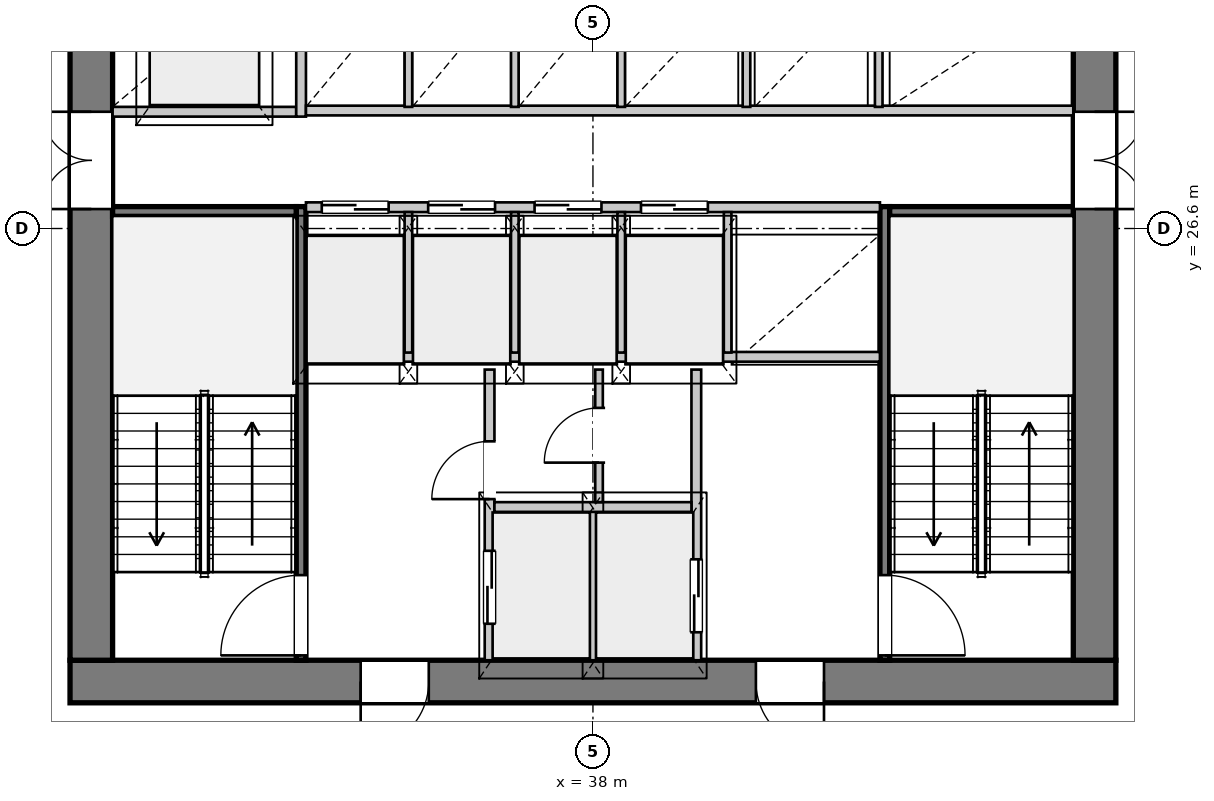
"""IFC4 building model, lengths in metres.
Left out: names, types, materials, properties, quantities, classifications, styles, units other than length and angle.
Written with IfcOpenShell. Run it as: python <this file> out.ifc"""

import sys

from ifc_helpers import new_model, si_unit, direction, frame, frame_2d, origin, place, context, subcontext, project, spatial, rectangle, extrude, source, transform, mapped, element, fill, save


model = new_model("IFC4")
c1 = context("Model", 3, precision=1e-05, world=origin(), true_north=direction((0.0, 1.0)))
c2 = subcontext(c1, "Body", "Model", "MODEL_VIEW")
j1 = project(units=[si_unit("LENGTHUNIT", "METRE"), si_unit("PLANEANGLEUNIT", "RADIAN")], contexts=[c1])
p1 = place(None, origin())
s1 = spatial("IfcSite", under=j1, at=p1, CompositionType="ELEMENT")
p2 = place(p1, origin())
s2 = spatial("IfcBuilding", under=s1, at=p2, CompositionType="ELEMENT")
p3 = place(p2, frame((0.0, 0.0, 127.0)))
s3 = spatial("IfcBuildingStorey", under=s2, at=p3, CompositionType="ELEMENT", Elevation=127.0)
p4 = place(p3, frame((46.6, 19.15, 0.0), z_axis=(0.0, 0.0, 1.0), x_axis=(-1.0, 0.0, 0.0)))
e1 = element("IfcWall", 1, at=p4, inside=s3, PredefinedType="SHEAR", context=c2, shape_type="SweptSolid", body=[
    extrude(rectangle(XDim=17.2, YDim=0.7, at=frame_2d((8.6, 0.0))), origin(), (0.0, 0.0, 1.0), 3.3),
])
p5 = place(p4, frame((4.8, 0.0, 0.0)))
e2 = element("IfcOpeningElement", 2, at=p5, cuts=e1, PredefinedType="OPENING", context=c2, shape_type="SweptSolid", body=[
    extrude(rectangle(XDim=1.12, YDim=2.25, at=frame_2d((0.56, 1.125))), frame((0.0, 0.36, 0.0), z_axis=(0.0, -1.0, 0.0), x_axis=(1.0, 0.0, 0.0)), (0.0, 0.0, 1.0), 0.72),
])
p6 = place(p4, frame((11.3, 0.0, 0.0)))
e3 = element("IfcOpeningElement", 3, at=p6, cuts=e1, PredefinedType="OPENING", context=c2, shape_type="SweptSolid", body=[
    extrude(rectangle(XDim=1.12, YDim=2.25, at=frame_2d((0.56, 1.125))), frame((0.0, 0.36, 0.0), z_axis=(0.0, -1.0, 0.0), x_axis=(1.0, 0.0, 0.0)), (0.0, 0.0, 1.0), 0.72),
])
p7 = place(p3, frame((29.75, 19.5, 0.0), z_axis=(0.0, 0.0, 1.0), x_axis=(0.0, 1.0, 0.0)))
e4 = element("IfcWall", 4, at=p7, inside=s3, PredefinedType="SHEAR", context=c2, shape_type="SweptSolid", body=[
    extrude(rectangle(XDim=14.2, YDim=0.7, at=frame_2d((7.1, 0.0))), origin(), (0.0, 0.0, 1.0), 3.3),
])
p8 = place(p7, frame((7.42, 0.0, 0.0)))
e5 = element("IfcOpeningElement", 5, at=p8, cuts=e4, PredefinedType="OPENING", context=c2, shape_type="SweptSolid", body=[
    extrude(rectangle(XDim=1.6, YDim=2.2, at=frame_2d((0.8, 1.1))), frame((0.0, 0.36, 0.0), z_axis=(0.0, -1.0, 0.0), x_axis=(1.0, 0.0, 0.0)), (0.0, 0.0, 1.0), 0.72),
])
p9 = place(p3, frame((46.25, 33.7, 0.0), z_axis=(0.0, 0.0, 1.0), x_axis=(0.0, -1.0, 0.0)))
e6 = element("IfcWall", 6, at=p9, inside=s3, PredefinedType="SHEAR", context=c2, shape_type="SweptSolid", body=[
    extrude(rectangle(XDim=14.2, YDim=0.7, at=frame_2d((7.1, 0.0))), origin(), (0.0, 0.0, 1.0), 3.3),
])
p10 = place(p9, frame((5.18, 0.0, 0.0)))
e7 = element("IfcOpeningElement", 7, at=p10, cuts=e6, PredefinedType="OPENING", context=c2, shape_type="SweptSolid", body=[
    extrude(rectangle(XDim=1.6, YDim=2.2, at=frame_2d((0.8, 1.1))), frame((0.0, 0.36, 0.0), z_axis=(0.0, -1.0, 0.0), x_axis=(1.0, 0.0, 0.0)), (0.0, 0.0, 1.0), 0.72),
])
p11 = place(p3, frame((33.2, 19.5, 0.0), z_axis=(0.0, 0.0, 1.0), x_axis=(0.0, 1.0, 0.0)))
e8 = element("IfcWall", 8, at=p11, inside=s3, PredefinedType="PARTITIONING", context=c2, shape_type="SweptSolid", body=[
    extrude(rectangle(XDim=7.46, YDim=0.16, at=frame_2d((3.73, 0.0))), origin(), (0.0, 0.0, 1.0), 3.3),
])
p12 = place(p11, frame((0.08, 0.0, 0.0)))
e9 = element("IfcOpeningElement", 9, at=p12, cuts=e8, PredefinedType="OPENING", context=c2, shape_type="SweptSolid", body=[
    extrude(rectangle(XDim=1.32, YDim=2.2, at=frame_2d((0.66, 1.1))), frame((0.0, 0.09, 0.0), z_axis=(0.0, -1.0, 0.0), x_axis=(1.0, 0.0, 0.0)), (0.0, 0.0, 1.0), 0.18),
])
p13 = place(p3, frame((30.1, 26.88, 0.0), z_axis=(0.0, 0.0, 1.0), x_axis=(1.0, 0.0, 0.0)))
e10 = element("IfcWall", 10, at=p13, inside=s3, PredefinedType="PARTITIONING", context=c2, shape_type="SweptSolid", body=[
    extrude(rectangle(XDim=3.02, YDim=0.16, at=frame_2d((1.51, 0.0))), origin(), (0.0, 0.0, 1.0), 3.3),
])
p14 = place(p3, frame((42.8, 26.96, 0.0), z_axis=(0.0, 0.0, 1.0), x_axis=(0.0, -1.0, 0.0)))
e11 = element("IfcWall", 11, at=p14, inside=s3, PredefinedType="PARTITIONING", context=c2, shape_type="SweptSolid", body=[
    extrude(rectangle(XDim=7.46, YDim=0.16, at=frame_2d((3.73, 0.0))), origin(), (0.0, 0.0, 1.0), 3.3),
])
p15 = place(p14, frame((6.06, 0.0, 0.0)))
e12 = element("IfcOpeningElement", 12, at=p15, cuts=e11, PredefinedType="OPENING", context=c2, shape_type="SweptSolid", body=[
    extrude(rectangle(XDim=1.32, YDim=2.2, at=frame_2d((0.66, 1.1))), frame((0.0, 0.09, 0.0), z_axis=(0.0, -1.0, 0.0), x_axis=(1.0, 0.0, 0.0)), (0.0, 0.0, 1.0), 0.18),
])
p16 = place(p3, frame((42.88, 26.88, 0.0), z_axis=(0.0, 0.0, 1.0), x_axis=(1.0, 0.0, 0.0)))
e13 = element("IfcWall", 13, at=p16, inside=s3, PredefinedType="PARTITIONING", context=c2, shape_type="SweptSolid", body=[
    extrude(rectangle(XDim=3.02, YDim=0.16, at=frame_2d((1.51, 0.0))), origin(), (0.0, 0.0, 1.0), 3.3),
])
p17 = place(p3, frame((36.3, 19.5, 0.0), z_axis=(0.0, 0.0, 1.0), x_axis=(0.0, 1.0, 0.0)))
e14 = element("IfcWall", 14, at=p17, inside=s3, PredefinedType="PARTITIONING", context=c2, shape_type="SweptSolid", body=[
    extrude(rectangle(XDim=4.78, YDim=0.16, at=frame_2d((2.39, 0.0))), origin(), (0.0, 0.0, 1.0), 3.3),
])
p18 = place(p17, frame((0.6, 0.0, 0.0)))
e15 = element("IfcOpeningElement", 15, at=p18, cuts=e14, PredefinedType="OPENING", context=c2, shape_type="SweptSolid", body=[
    extrude(rectangle(XDim=1.2, YDim=2.2, at=frame_2d((0.6, 1.1))), frame((0.0, 0.09, 0.0), z_axis=(0.0, -1.0, 0.0), x_axis=(1.0, 0.0, 0.0)), (0.0, 0.0, 1.0), 0.18),
])
p19 = place(p17, frame((2.65, 0.0, 0.0)))
e16 = element("IfcOpeningElement", 16, at=p19, cuts=e14, PredefinedType="OPENING", context=c2, shape_type="SweptSolid", body=[
    extrude(rectangle(XDim=0.95, YDim=2.1, at=frame_2d((0.475, 1.05))), frame((0.0, 0.09, 0.0), z_axis=(0.0, -1.0, 0.0), x_axis=(1.0, 0.0, 0.0)), (0.0, 0.0, 1.0), 0.18),
])
p20 = place(p3, frame((39.7, 24.28, 0.0), z_axis=(0.0, 0.0, 1.0), x_axis=(0.0, -1.0, 0.0)))
e17 = element("IfcWall", 17, at=p20, inside=s3, PredefinedType="PARTITIONING", context=c2, shape_type="SweptSolid", body=[
    extrude(rectangle(XDim=4.78, YDim=0.16, at=frame_2d((2.39, 0.0))), origin(), (0.0, 0.0, 1.0), 3.3),
])
p21 = place(p20, frame((3.12, 0.0, 0.0)))
e18 = element("IfcOpeningElement", 18, at=p21, cuts=e17, PredefinedType="OPENING", context=c2, shape_type="SweptSolid", body=[
    extrude(rectangle(XDim=1.2, YDim=2.2, at=frame_2d((0.6, 1.1))), frame((0.0, 0.09, 0.0), z_axis=(0.0, -1.0, 0.0), x_axis=(1.0, 0.0, 0.0)), (0.0, 0.0, 1.0), 0.18),
])
p22 = place(p3, frame((38.0, 19.5, 0.0), z_axis=(0.0, 0.0, 1.0), x_axis=(0.0, 1.0, 0.0)))
e19 = element("IfcWall", 19, at=p22, inside=s3, PredefinedType="PARTITIONING", context=c2, shape_type="SweptSolid", body=[
    extrude(rectangle(XDim=2.46, YDim=0.125, at=frame_2d((1.23, 0.0))), origin(), (0.0, 0.0, 1.0), 3.3),
])
p23 = place(p3, frame((36.38, 22.02, 0.0), z_axis=(0.0, 0.0, 1.0), x_axis=(1.0, 0.0, 0.0)))
e20 = element("IfcWall", 20, at=p23, inside=s3, PredefinedType="PARTITIONING", context=c2, shape_type="SweptSolid", body=[
    extrude(rectangle(XDim=3.24, YDim=0.16, at=frame_2d((1.62, 0.0))), origin(), (0.0, 0.0, 1.0), 3.3),
])
p24 = place(p3, frame((33.28, 24.49, 0.0), z_axis=(0.0, 0.0, 1.0), x_axis=(1.0, 0.0, 0.0)))
e21 = element("IfcWall", 21, at=p24, inside=s3, PredefinedType="PARTITIONING", context=c2, shape_type="SweptSolid", body=[
    extrude(rectangle(XDim=9.44, YDim=0.16, at=frame_2d((4.72, 0.0))), origin(), (0.0, 0.0, 1.0), 3.3),
])
p25 = place(p3, frame((38.1, 22.1, 0.0), z_axis=(0.0, 0.0, 1.0), x_axis=(0.0, 1.0, 0.0)))
e22 = element("IfcWall", 22, at=p25, inside=s3, PredefinedType="PARTITIONING", context=c2, shape_type="SweptSolid", body=[
    extrude(rectangle(XDim=2.18, YDim=0.125, at=frame_2d((1.09, 0.0))), origin(), (0.0, 0.0, 1.0), 3.3),
])
p26 = place(p25, frame((0.65, 0.0, 0.0)))
e23 = element("IfcOpeningElement", 23, at=p26, cuts=e22, PredefinedType="OPENING", context=c2, shape_type="SweptSolid", body=[
    extrude(rectangle(XDim=0.9, YDim=2.1, at=frame_2d((0.45, 1.05))), frame((0.0, 0.073, 0.0), z_axis=(0.0, -1.0, 0.0), x_axis=(1.0, 0.0, 0.0)), (0.0, 0.0, 1.0), 0.145),
])
p27 = place(p3, frame((30.1, 28.52, 0.0), z_axis=(0.0, 0.0, 1.0), x_axis=(1.0, 0.0, 0.0)))
e24 = element("IfcWall", 24, at=p27, inside=s3, PredefinedType="PARTITIONING", context=c2, shape_type="SweptSolid", body=[
    extrude(rectangle(XDim=3.02, YDim=0.16, at=frame_2d((1.51, 0.0))), origin(), (0.0, 0.0, 1.0), 3.3),
])
p28 = place(p3, frame((33.2, 28.44, 0.0), z_axis=(0.0, 0.0, 1.0), x_axis=(0.0, 1.0, 0.0)))
e25 = element("IfcWall", 25, at=p28, inside=s3, PredefinedType="PARTITIONING", context=c2, shape_type="SweptSolid", body=[
    extrude(rectangle(XDim=5.26, YDim=0.16, at=frame_2d((2.63, 0.0))), origin(), (0.0, 0.0, 1.0), 3.3),
])
p29 = place(p3, frame((33.28, 26.95, 0.0), z_axis=(0.0, 0.0, 1.0), x_axis=(1.0, 0.0, 0.0)))
e26 = element("IfcWall", 26, at=p29, inside=s3, PredefinedType="PARTITIONING", context=c2, shape_type="SweptSolid", body=[
    extrude(rectangle(XDim=9.44, YDim=0.16, at=frame_2d((4.72, 0.0))), origin(), (0.0, 0.0, 1.0), 3.3),
])
p30 = place(p29, frame((0.26, 0.0, 0.0)))
e27 = element("IfcOpeningElement", 27, at=p30, cuts=e26, PredefinedType="OPENING", context=c2, shape_type="SweptSolid", body=[
    extrude(rectangle(XDim=1.1, YDim=2.2, at=frame_2d((0.55, 1.1))), frame((0.0, 0.09, 0.0), z_axis=(0.0, -1.0, 0.0), x_axis=(1.0, 0.0, 0.0)), (0.0, 0.0, 1.0), 0.18),
])
p31 = place(p29, frame((2.01, 0.0, 0.0)))
e28 = element("IfcOpeningElement", 28, at=p31, cuts=e26, PredefinedType="OPENING", context=c2, shape_type="SweptSolid", body=[
    extrude(rectangle(XDim=1.1, YDim=2.2, at=frame_2d((0.55, 1.1))), frame((0.0, 0.09, 0.0), z_axis=(0.0, -1.0, 0.0), x_axis=(1.0, 0.0, 0.0)), (0.0, 0.0, 1.0), 0.18),
])
p32 = place(p29, frame((3.76, 0.0, 0.0)))
e29 = element("IfcOpeningElement", 29, at=p32, cuts=e26, PredefinedType="OPENING", context=c2, shape_type="SweptSolid", body=[
    extrude(rectangle(XDim=1.1, YDim=2.2, at=frame_2d((0.55, 1.1))), frame((0.0, 0.09, 0.0), z_axis=(0.0, -1.0, 0.0), x_axis=(1.0, 0.0, 0.0)), (0.0, 0.0, 1.0), 0.18),
])
p33 = place(p29, frame((5.51, 0.0, 0.0)))
e30 = element("IfcOpeningElement", 30, at=p33, cuts=e26, PredefinedType="OPENING", context=c2, shape_type="SweptSolid", body=[
    extrude(rectangle(XDim=1.1, YDim=2.2, at=frame_2d((0.55, 1.1))), frame((0.0, 0.09, 0.0), z_axis=(0.0, -1.0, 0.0), x_axis=(1.0, 0.0, 0.0)), (0.0, 0.0, 1.0), 0.18),
])
for number, where, z_axis, x_axis in (
    (31, (34.965, 24.56, 0.0), (0.0, 0.0, 1.0), (0.0, 1.0, 0.0)),
    (32, (36.715, 24.56, 0.0), (0.0, 0.0, 1.0), (0.0, 1.0, 0.0)),
    (33, (38.465, 24.56, 0.0), (0.0, 0.0, 1.0), (0.0, 1.0, 0.0)),
    (34, (40.215, 24.56, 0.0), (0.0, 0.0, 1.0), (0.0, 1.0, 0.0)),
):
    element("IfcWall", number, at=place(p3, frame(where, z_axis=z_axis, x_axis=x_axis)), inside=s3, PredefinedType="PARTITIONING", context=c2, shape_type="SweptSolid", body=[
        extrude(rectangle(XDim=2.31, YDim=0.125, at=frame_2d((1.155, 0.0))), origin(), (0.0, 0.0, 1.0), 3.3),
    ])
p34 = place(p3, frame((33.28, 28.54, 0.0), z_axis=(0.0, 0.0, 1.0), x_axis=(1.0, 0.0, 0.0)))
e35 = element("IfcWall", 35, at=p34, inside=s3, PredefinedType="PARTITIONING", context=c2, shape_type="SweptSolid", body=[
    extrude(rectangle(XDim=12.62, YDim=0.16, at=frame_2d((6.31, 0.0))), origin(), (0.0, 0.0, 1.0), 3.3),
])
for number, where, z_axis, x_axis in (
    (36, (34.965, 28.6, 0.0), (0.0, 0.0, 1.0), (0.0, 1.0, 0.0)),
    (37, (36.715, 28.6, 0.0), (0.0, 0.0, 1.0), (0.0, 1.0, 0.0)),
    (38, (38.465, 28.6, 0.0), (0.0, 0.0, 1.0), (0.0, 1.0, 0.0)),
    (39, (40.525, 28.6, 0.0), (0.0, 0.0, 1.0), (0.0, 1.0, 0.0)),
    (40, (42.7, 28.6, 0.0), (0.0, 0.0, 1.0), (0.0, 1.0, 0.0)),
):
    element("IfcWall", number, at=place(p3, frame(where, z_axis=z_axis, x_axis=x_axis)), inside=s3, PredefinedType="PARTITIONING", context=c2, shape_type="SweptSolid", body=[
        extrude(rectangle(XDim=1.92, YDim=0.125, at=frame_2d((0.96, 0.0))), origin(), (0.0, 0.0, 1.0), 3.3),
    ])
m1 = source(origin(), c2, "Body", "SweptSolid", [
    extrude(rectangle(XDim=1.12, YDim=2.25, at=frame_2d((0.56, 1.125))), frame((0.0, 0.025, 0.0), z_axis=(0.0, -1.0, 0.0), x_axis=(1.0, 0.0, 0.0)), (0.0, 0.0, 1.0), 0.05),
])
p35 = place(p5, origin())
e41 = element("IfcDoor", 41, at=p35, inside=s3, OperationType="SINGLE_SWING_LEFT", PredefinedType="DOOR", context=c2, shape_type="MappedRepresentation", body=[
    mapped(m1, transform((0.0, 0.0, 0.0), x_axis=(1.0, 0.0, 0.0), y_axis=(0.0, 1.0, 0.0), z_axis=(0.0, 0.0, 1.0), scale=1.0)),
])
fill(e2, e41)
p36 = place(p6, origin())
e42 = element("IfcDoor", 42, at=p36, inside=s3, OperationType="SINGLE_SWING_RIGHT", PredefinedType="DOOR", context=c2, shape_type="MappedRepresentation", body=[
    mapped(m1, transform((0.0, 0.0, 0.0), x_axis=(1.0, 0.0, 0.0), y_axis=(0.0, 1.0, 0.0), z_axis=(0.0, 0.0, 1.0), scale=1.0)),
])
fill(e3, e42)
m2 = source(origin(), c2, "Body", "SweptSolid", [
    extrude(rectangle(XDim=1.6, YDim=2.2, at=frame_2d((0.8, 1.1))), frame((0.0, 0.025, 0.0), z_axis=(0.0, -1.0, 0.0), x_axis=(1.0, 0.0, 0.0)), (0.0, 0.0, 1.0), 0.05),
])
p37 = place(p8, origin())
e43 = element("IfcDoor", 43, at=p37, inside=s3, OperationType="DOUBLE_DOOR_SINGLE_SWING", PredefinedType="DOOR", context=c2, shape_type="MappedRepresentation", body=[
    mapped(m2, transform((0.0, 0.0, 0.0), x_axis=(1.0, 0.0, 0.0), y_axis=(0.0, 1.0, 0.0), z_axis=(0.0, 0.0, 1.0), scale=1.0)),
])
fill(e5, e43)
p38 = place(p10, origin())
e44 = element("IfcDoor", 44, at=p38, inside=s3, OperationType="DOUBLE_DOOR_SINGLE_SWING", PredefinedType="DOOR", context=c2, shape_type="MappedRepresentation", body=[
    mapped(m2, transform((0.0, 0.0, 0.0), x_axis=(1.0, 0.0, 0.0), y_axis=(0.0, 1.0, 0.0), z_axis=(0.0, 0.0, 1.0), scale=1.0)),
])
fill(e7, e44)
m3 = source(origin(), c2, "Body", "SweptSolid", [
    extrude(rectangle(XDim=1.32, YDim=2.2, at=frame_2d((0.66, 1.1))), frame((0.0, 0.025, 0.0), z_axis=(0.0, -1.0, 0.0), x_axis=(1.0, 0.0, 0.0)), (0.0, 0.0, 1.0), 0.05),
])
p39 = place(p12, origin())
e45 = element("IfcDoor", 45, at=p39, inside=s3, OperationType="SINGLE_SWING_LEFT", PredefinedType="DOOR", context=c2, shape_type="MappedRepresentation", body=[
    mapped(m3, transform((0.0, 0.0, 0.0), x_axis=(1.0, 0.0, 0.0), y_axis=(0.0, 1.0, 0.0), z_axis=(0.0, 0.0, 1.0), scale=1.0)),
])
fill(e9, e45)
p40 = place(p15, origin())
e46 = element("IfcDoor", 46, at=p40, inside=s3, OperationType="SINGLE_SWING_RIGHT", PredefinedType="DOOR", context=c2, shape_type="MappedRepresentation", body=[
    mapped(m3, transform((0.0, 0.0, 0.0), x_axis=(1.0, 0.0, 0.0), y_axis=(0.0, 1.0, 0.0), z_axis=(0.0, 0.0, 1.0), scale=1.0)),
])
fill(e12, e46)
m4 = source(origin(), c2, "Body", "SweptSolid", [
    extrude(rectangle(XDim=1.2, YDim=2.2, at=frame_2d((0.6, 1.1))), frame((0.0, 0.025, 0.0), z_axis=(0.0, -1.0, 0.0), x_axis=(1.0, 0.0, 0.0)), (0.0, 0.0, 1.0), 0.05),
])
p41 = place(p18, origin())
e47 = element("IfcDoor", 47, at=p41, inside=s3, OperationType="DOUBLE_DOOR_SLIDING", PredefinedType="DOOR", context=c2, shape_type="MappedRepresentation", body=[
    mapped(m4, transform((0.0, 0.0, 0.0), x_axis=(1.0, 0.0, 0.0), y_axis=(0.0, 1.0, 0.0), z_axis=(0.0, 0.0, 1.0), scale=1.0)),
])
fill(e15, e47)
m5 = source(origin(), c2, "Body", "SweptSolid", [
    extrude(rectangle(XDim=0.95, YDim=2.1, at=frame_2d((0.475, 1.05))), frame((0.0, 0.025, 0.0), z_axis=(0.0, -1.0, 0.0), x_axis=(1.0, 0.0, 0.0)), (0.0, 0.0, 1.0), 0.05),
])
p42 = place(p19, origin())
e48 = element("IfcDoor", 48, at=p42, inside=s3, OperationType="SINGLE_SWING_LEFT", PredefinedType="DOOR", context=c2, shape_type="MappedRepresentation", body=[
    mapped(m5, transform((0.0, 0.0, 0.0), x_axis=(1.0, 0.0, 0.0), y_axis=(0.0, 1.0, 0.0), z_axis=(0.0, 0.0, 1.0), scale=1.0)),
])
fill(e16, e48)
m6 = source(origin(), c2, "Body", "SweptSolid", [
    extrude(rectangle(XDim=0.9, YDim=2.1, at=frame_2d((0.45, 1.05))), frame((0.0, 0.025, 0.0), z_axis=(0.0, -1.0, 0.0), x_axis=(1.0, 0.0, 0.0)), (0.0, 0.0, 1.0), 0.05),
])
p43 = place(p26, origin())
e49 = element("IfcDoor", 49, at=p43, inside=s3, OperationType="SINGLE_SWING_LEFT", PredefinedType="DOOR", context=c2, shape_type="MappedRepresentation", body=[
    mapped(m6, transform((0.0, 0.0, 0.0), x_axis=(1.0, 0.0, 0.0), y_axis=(0.0, 1.0, 0.0), z_axis=(0.0, 0.0, 1.0), scale=1.0)),
])
fill(e23, e49)
p44 = place(p21, origin())
e50 = element("IfcDoor", 50, at=p44, inside=s3, OperationType="DOUBLE_DOOR_SLIDING", PredefinedType="DOOR", context=c2, shape_type="MappedRepresentation", body=[
    mapped(m4, transform((0.0, 0.0, 0.0), x_axis=(1.0, 0.0, 0.0), y_axis=(0.0, 1.0, 0.0), z_axis=(0.0, 0.0, 1.0), scale=1.0)),
])
fill(e18, e50)
m7 = source(origin(), c2, "Body", "SweptSolid", [
    extrude(rectangle(XDim=1.1, YDim=2.2, at=frame_2d((0.55, 1.1))), frame((0.0, 0.025, 0.0), z_axis=(0.0, -1.0, 0.0), x_axis=(1.0, 0.0, 0.0)), (0.0, 0.0, 1.0), 0.05),
])
p45 = place(p30, origin())
e51 = element("IfcDoor", 51, at=p45, inside=s3, OperationType="DOUBLE_DOOR_SLIDING", PredefinedType="DOOR", context=c2, shape_type="MappedRepresentation", body=[
    mapped(m7, transform((0.0, 0.0, 0.0), x_axis=(1.0, 0.0, 0.0), y_axis=(0.0, 1.0, 0.0), z_axis=(0.0, 0.0, 1.0), scale=1.0)),
])
fill(e27, e51)
p46 = place(p31, origin())
e52 = element("IfcDoor", 52, at=p46, inside=s3, OperationType="DOUBLE_DOOR_SLIDING", PredefinedType="DOOR", context=c2, shape_type="MappedRepresentation", body=[
    mapped(m7, transform((0.0, 0.0, 0.0), x_axis=(1.0, 0.0, 0.0), y_axis=(0.0, 1.0, 0.0), z_axis=(0.0, 0.0, 1.0), scale=1.0)),
])
fill(e28, e52)
p47 = place(p32, origin())
e53 = element("IfcDoor", 53, at=p47, inside=s3, OperationType="DOUBLE_DOOR_SLIDING", PredefinedType="DOOR", context=c2, shape_type="MappedRepresentation", body=[
    mapped(m7, transform((0.0, 0.0, 0.0), x_axis=(1.0, 0.0, 0.0), y_axis=(0.0, 1.0, 0.0), z_axis=(0.0, 0.0, 1.0), scale=1.0)),
])
fill(e29, e53)
p48 = place(p33, origin())
e54 = element("IfcDoor", 54, at=p48, inside=s3, OperationType="DOUBLE_DOOR_SLIDING", PredefinedType="DOOR", context=c2, shape_type="MappedRepresentation", body=[
    mapped(m7, transform((0.0, 0.0, 0.0), x_axis=(1.0, 0.0, 0.0), y_axis=(0.0, 1.0, 0.0), z_axis=(0.0, 0.0, 1.0), scale=1.0)),
])
fill(e30, e54)
save(model, sys.argv[1])
